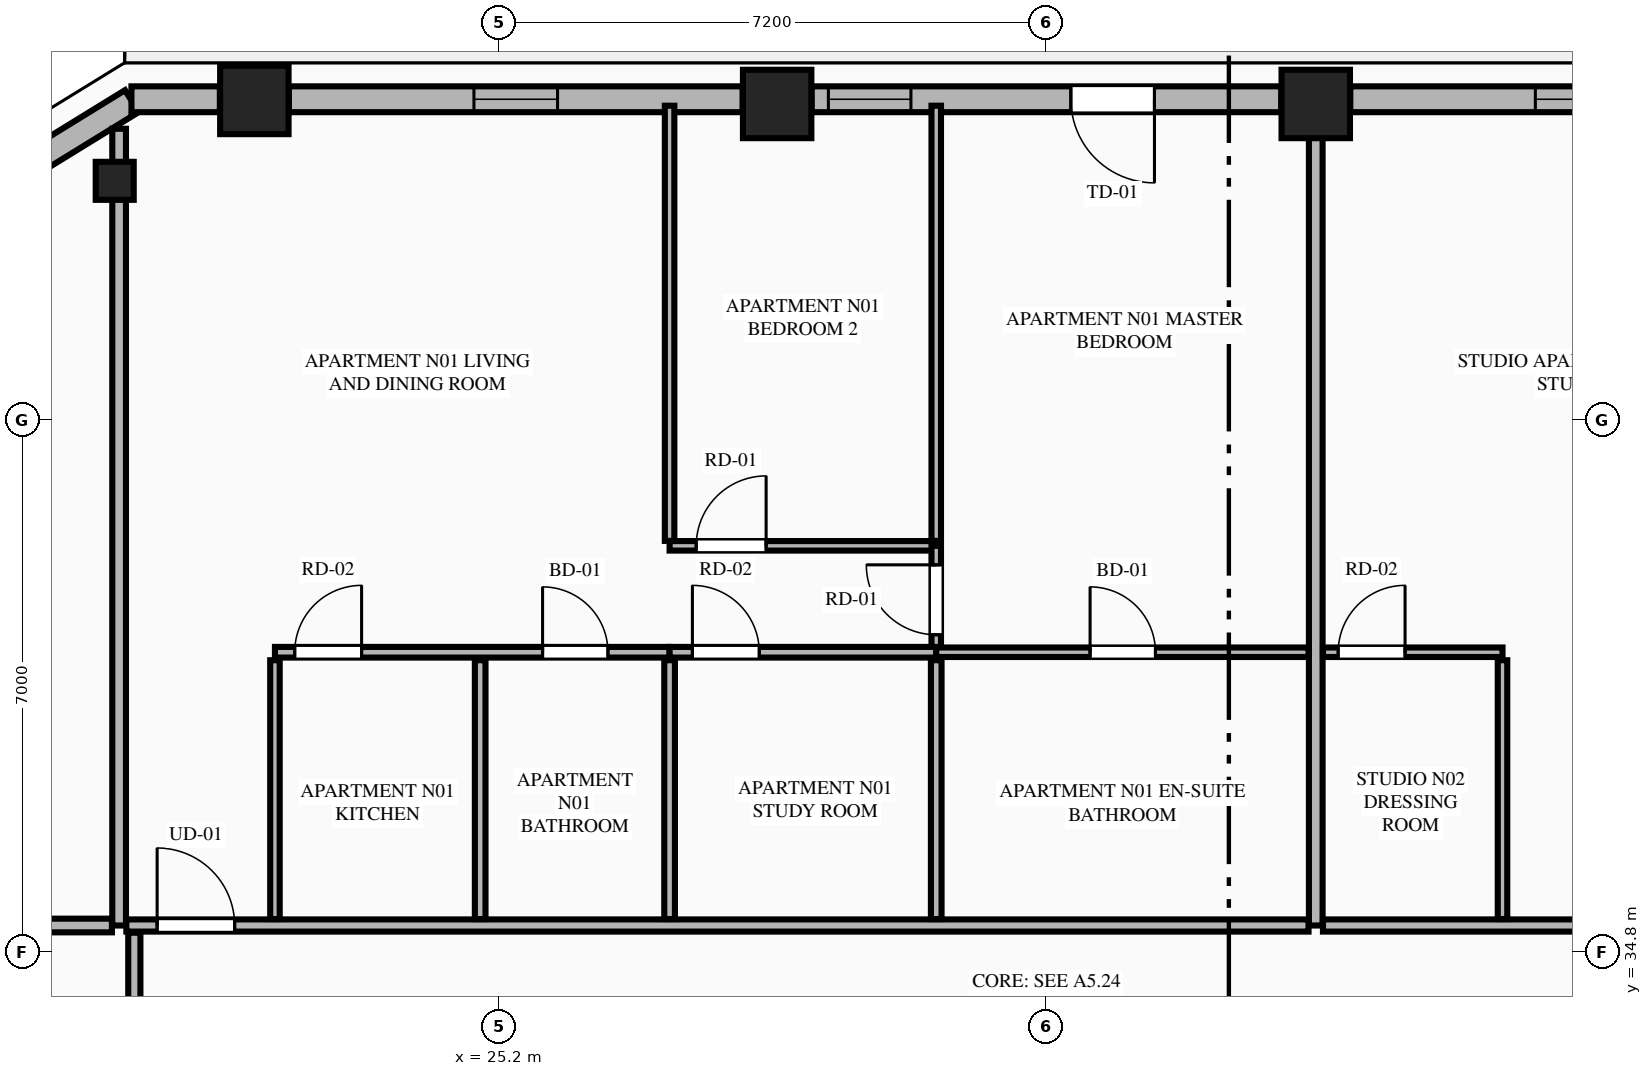
"""IFC4 building model, lengths in metres.
Left out: names, types, materials, properties, quantities, classifications, styles, units other than length and angle.
Written with IfcOpenShell. Run it as: python <this file> out.ifc"""

import sys

from ifc_helpers import new_model, si_unit, direction, frame, frame_2d, origin, origin_2d, place, context, subcontext, project, spatial, rectangle, extrude, element, fill, save


model = new_model("IFC4")
c1 = context("Model", 3, precision=1e-05, world=origin(), true_north=direction((0.0, 1.0)))
c2 = subcontext(c1, "Body", "Model", "MODEL_VIEW")
j1 = project(units=[si_unit("LENGTHUNIT", "METRE"), si_unit("PLANEANGLEUNIT", "RADIAN")], contexts=[c1])
p1 = place(None, origin())
s1 = spatial("IfcSite", under=j1, at=p1, CompositionType="ELEMENT")
p2 = place(p1, origin())
s2 = spatial("IfcBuilding", under=s1, at=p2, CompositionType="ELEMENT")
p3 = place(p2, frame((0.0, 0.0, 175.45)))
s3 = spatial("IfcBuildingStorey", under=s2, at=p3, CompositionType="ELEMENT", Elevation=175.45)
for number, where, z_axis, x_axis in (
    (1, (35.943, 45.958, 0.0), (0.0, 0.0, 1.0), (1.0, 0.0, 0.0)),
    (2, (28.857, 45.958, 0.0), (0.0, 0.0, 1.0), (1.0, 0.0, 0.0)),
    (3, (21.979, 46.011, 0.0), (0.0, 0.0, 1.0), (1.0, 0.0, 0.0)),
):
    element("IfcColumn", number, at=place(p3, frame(where, z_axis=z_axis, x_axis=x_axis)), inside=s3, PredefinedType="COLUMN", context=c2, shape_type="SweptSolid", body=[
        extrude(rectangle(XDim=0.9, YDim=0.9, at=origin_2d()), origin(), (0.0, 0.0, 1.0), 3.55),
    ])
p4 = place(p3, frame((20.142, 44.947, 0.0), z_axis=(0.0, 0.0, 1.0), x_axis=(-0.865230187018, -0.501374833306, 0.0)))
e4 = element("IfcColumn", 4, at=p4, inside=s3, PredefinedType="PILASTER", context=c2, shape_type="SweptSolid", body=[
    extrude(rectangle(XDim=0.5, YDim=0.35, at=origin_2d()), origin(), (0.0, 0.0, 1.0), 3.55),
])
p5 = place(p3, frame((20.367, 45.995, 0.0), z_axis=(0.0, 0.0, 1.0), x_axis=(-0.851713271379, -0.524008113828, 0.0)))
e5 = element("IfcWall", 5, at=p5, inside=s3, PredefinedType="STANDARD", context=c2, shape_type="SweptSolid", body=[
    extrude(rectangle(XDim=1.678, YDim=0.34, at=frame_2d((0.839, 0.0))), origin(), (0.0, 0.0, 1.0), 3.35),
])
p6 = place(p3, frame((42.367, 46.02, 0.0), z_axis=(0.0, 0.0, 1.0), x_axis=(-1.0, 0.0, 0.0)))
e6 = element("IfcWall", 6, at=p6, inside=s3, PredefinedType="STANDARD", context=c2, shape_type="SweptSolid", body=[
    extrude(rectangle(XDim=5.97, YDim=0.34, at=frame_2d((2.985, 0.0))), origin(), (0.0, 0.0, 1.0), 2.883),
])
p7 = place(p6, frame((2.435, 0.0, 0.75)))
e7 = element("IfcOpeningElement", 7, at=p7, cuts=e6, PredefinedType="OPENING", context=c2, shape_type="SweptSolid", body=[
    extrude(rectangle(XDim=1.1, YDim=1.983, at=frame_2d((0.55, 0.991))), frame((0.0, 0.18, 0.0), z_axis=(0.0, -1.0, 0.0), x_axis=(1.0, 0.0, 0.0)), (0.0, 0.0, 1.0), 0.36),
])
p8 = place(p3, frame((35.489, 46.02, 0.0), z_axis=(0.0, 0.0, 1.0), x_axis=(-1.0, 0.0, 0.0)))
e8 = element("IfcWall", 8, at=p8, inside=s3, PredefinedType="STANDARD", context=c2, shape_type="SweptSolid", body=[
    extrude(rectangle(XDim=6.178, YDim=0.34, at=frame_2d((3.089, 0.0))), origin(), (0.0, 0.0, 1.0), 2.883),
])
p9 = place(p8, frame((1.668, 0.0, 0.0)))
e9 = element("IfcOpeningElement", 9, at=p9, cuts=e8, PredefinedType="OPENING", context=c2, shape_type="SweptSolid", body=[
    extrude(rectangle(XDim=1.1, YDim=2.25, at=frame_2d((0.55, 1.125))), frame((0.0, 0.18, 0.0), z_axis=(0.0, -1.0, 0.0), x_axis=(1.0, 0.0, 0.0)), (0.0, 0.0, 1.0), 0.36),
])
p10 = place(p8, frame((4.872, 0.0, 0.75)))
e10 = element("IfcOpeningElement", 10, at=p10, cuts=e8, PredefinedType="OPENING", context=c2, shape_type="SweptSolid", body=[
    extrude(rectangle(XDim=1.086, YDim=1.983, at=frame_2d((0.543, 0.991))), frame((0.0, 0.18, 0.0), z_axis=(0.0, -1.0, 0.0), x_axis=(1.0, 0.0, 0.0)), (0.0, 0.0, 1.0), 0.36),
])
p11 = place(p3, frame((28.403, 46.02, 0.0), z_axis=(0.0, 0.0, 1.0), x_axis=(-1.0, 0.0, 0.0)))
e11 = element("IfcWall", 11, at=p11, inside=s3, PredefinedType="STANDARD", context=c2, shape_type="SweptSolid", body=[
    extrude(rectangle(XDim=5.97, YDim=0.34, at=frame_2d((2.985, 0.0))), origin(), (0.0, 0.0, 1.0), 2.883),
])
p12 = place(p11, frame((2.435, 0.0, 0.75)))
e12 = element("IfcOpeningElement", 12, at=p12, cuts=e11, PredefinedType="OPENING", context=c2, shape_type="SweptSolid", body=[
    extrude(rectangle(XDim=1.1, YDim=1.983, at=frame_2d((0.55, 0.991))), frame((0.0, 0.18, 0.0), z_axis=(0.0, -1.0, 0.0), x_axis=(1.0, 0.0, 0.0)), (0.0, 0.0, 1.0), 0.36),
])
p13 = place(p3, frame((21.525, 46.02, 0.0), z_axis=(0.0, 0.0, 1.0), x_axis=(-1.0, 0.0, 0.0)))
e13 = element("IfcWall", 13, at=p13, inside=s3, PredefinedType="STANDARD", context=c2, shape_type="SweptSolid", body=[
    extrude(rectangle(XDim=1.163, YDim=0.34, at=frame_2d((0.582, 0.0))), origin(), (0.0, 0.0, 1.0), 3.35),
])
p14 = place(p3, frame((20.2, 35.15, 0.0), z_axis=(0.0, 0.0, 1.0), x_axis=(0.0, 1.0, 0.0)))
e14 = element("IfcWall", 14, at=p14, inside=s3, PredefinedType="PARTITIONING", context=c2, shape_type="SweptSolid", body=[
    extrude(rectangle(XDim=10.482, YDim=0.18, at=frame_2d((5.241, 0.0))), origin(), (0.0, 0.0, 1.0), 3.35),
])
p15 = place(p3, frame((35.943, 35.15, 0.0), z_axis=(0.0, 0.0, 1.0), x_axis=(0.0, 1.0, 0.0)))
e15 = element("IfcWall", 15, at=p15, inside=s3, PredefinedType="PARTITIONING", context=c2, shape_type="SweptSolid", body=[
    extrude(rectangle(XDim=10.695, YDim=0.18, at=frame_2d((5.348, 0.0))), origin(), (0.0, 0.0, 1.0), 2.807),
])
p16 = place(p3, frame((20.295, 35.15, 0.0), z_axis=(0.0, 0.0, 1.0), x_axis=(1.0, 0.0, 0.0)))
e16 = element("IfcWall", 16, at=p16, inside=s3, PredefinedType="PARTITIONING", context=c2, shape_type="SweptSolid", body=[
    extrude(rectangle(XDim=15.553, YDim=0.16, at=frame_2d((7.776, 0.0))), origin(), (0.0, 0.0, 1.0), 3.35),
])
p17 = place(p16, frame((0.405, 0.0, 0.0)))
e17 = element("IfcOpeningElement", 17, at=p17, cuts=e16, PredefinedType="OPENING", context=c2, shape_type="SweptSolid", body=[
    extrude(rectangle(XDim=1.02, YDim=2.25, at=frame_2d((0.51, 1.125))), frame((0.0, 0.09, 0.0), z_axis=(0.0, -1.0, 0.0), x_axis=(1.0, 0.0, 0.0)), (0.0, 0.0, 1.0), 0.18),
])
p18 = place(p3, frame((22.25, 35.235, 0.0), z_axis=(0.0, 0.0, 1.0), x_axis=(0.0, 1.0, 0.0)))
e18 = element("IfcWall", 18, at=p18, inside=s3, PredefinedType="PARTITIONING", context=c2, shape_type="SweptSolid", body=[
    extrude(rectangle(XDim=3.405, YDim=0.125, at=frame_2d((1.702, 0.0))), origin(), (0.0, 0.0, 1.0), 2.807),
])
p19 = place(p3, frame((22.25, 38.745, 0.0), z_axis=(0.0, 0.0, 1.0), x_axis=(1.0, 0.0, 0.0)))
e19 = element("IfcWall", 19, at=p19, inside=s3, PredefinedType="PLUMBINGWALL", context=c2, shape_type="SweptSolid", body=[
    extrude(rectangle(XDim=5.192, YDim=0.14, at=frame_2d((2.596, 0.0))), origin(), (0.0, 0.0, 1.0), 3.35),
])
p20 = place(p19, frame((3.521, 0.0, 0.0)))
e20 = element("IfcOpeningElement", 20, at=p20, cuts=e19, PredefinedType="OPENING", context=c2, shape_type="SweptSolid", body=[
    extrude(rectangle(XDim=0.86, YDim=2.1, at=frame_2d((0.43, 1.05))), frame((0.0, 0.08, 0.0), z_axis=(0.0, -1.0, 0.0), x_axis=(1.0, 0.0, 0.0)), (0.0, 0.0, 1.0), 0.16),
])
p21 = place(p19, frame((0.26, 0.0, 0.0)))
e21 = element("IfcOpeningElement", 21, at=p21, cuts=e19, PredefinedType="OPENING", context=c2, shape_type="SweptSolid", body=[
    extrude(rectangle(XDim=0.88, YDim=2.15, at=frame_2d((0.44, 1.075))), frame((0.0, 0.08, 0.0), z_axis=(0.0, -1.0, 0.0), x_axis=(1.0, 0.0, 0.0)), (0.0, 0.0, 1.0), 0.16),
])
p22 = place(p3, frame((27.442, 38.745, 0.0), z_axis=(0.0, 0.0, 1.0), x_axis=(1.0, 0.0, 0.0)))
e22 = element("IfcWall", 22, at=p22, inside=s3, PredefinedType="PLUMBINGWALL", context=c2, shape_type="SweptSolid", body=[
    extrude(rectangle(XDim=3.508, YDim=0.14, at=frame_2d((1.754, 0.0))), origin(), (0.0, 0.0, 1.0), 3.35),
])
p23 = place(p22, frame((0.3, 0.0, 0.0)))
e23 = element("IfcOpeningElement", 23, at=p23, cuts=e22, PredefinedType="OPENING", context=c2, shape_type="SweptSolid", body=[
    extrude(rectangle(XDim=0.88, YDim=2.15, at=frame_2d((0.44, 1.075))), frame((0.0, 0.08, 0.0), z_axis=(0.0, -1.0, 0.0), x_axis=(1.0, 0.0, 0.0)), (0.0, 0.0, 1.0), 0.16),
])
p24 = place(p3, frame((30.95, 38.745, 0.0), z_axis=(0.0, 0.0, 1.0), x_axis=(1.0, 0.0, 0.0)))
e24 = element("IfcWall", 24, at=p24, inside=s3, PredefinedType="PARTITIONING", context=c2, shape_type="SweptSolid", body=[
    extrude(rectangle(XDim=4.898, YDim=0.125, at=frame_2d((2.449, 0.0))), origin(), (0.0, 0.0, 1.0), 3.35),
])
p25 = place(p24, frame((2.024, 0.0, 0.0)))
e25 = element("IfcOpeningElement", 25, at=p25, cuts=e24, PredefinedType="OPENING", context=c2, shape_type="SweptSolid", body=[
    extrude(rectangle(XDim=0.86, YDim=2.1, at=frame_2d((0.43, 1.05))), frame((0.0, 0.073, 0.0), z_axis=(0.0, -1.0, 0.0), x_axis=(1.0, 0.0, 0.0)), (0.0, 0.0, 1.0), 0.145),
])
p26 = place(p3, frame((24.95, 35.235, 0.0), z_axis=(0.0, 0.0, 1.0), x_axis=(0.0, 1.0, 0.0)))
e26 = element("IfcWall", 26, at=p26, inside=s3, PredefinedType="PLUMBINGWALL", context=c2, shape_type="SweptSolid", body=[
    extrude(rectangle(XDim=3.405, YDim=0.14, at=frame_2d((1.702, 0.0))), origin(), (0.0, 0.0, 1.0), 3.35),
])
p27 = place(p3, frame((27.442, 40.21, 0.0), z_axis=(0.0, 0.0, 1.0), x_axis=(0.0, 1.0, 0.0)))
e27 = element("IfcWall", 27, at=p27, inside=s3, PredefinedType="PARTITIONING", context=c2, shape_type="SweptSolid", body=[
    extrude(rectangle(XDim=5.725, YDim=0.125, at=frame_2d((2.863, 0.0))), origin(), (0.0, 0.0, 1.0), 3.35),
])
p28 = place(p3, frame((27.442, 40.145, 0.0), z_axis=(0.0, 0.0, 1.0), x_axis=(1.0, 0.0, 0.0)))
e28 = element("IfcWall", 28, at=p28, inside=s3, PredefinedType="PARTITIONING", context=c2, shape_type="SweptSolid", body=[
    extrude(rectangle(XDim=3.508, YDim=0.125, at=frame_2d((1.754, 0.0))), origin(), (0.0, 0.0, 1.0), 3.35),
])
p29 = place(p28, frame((0.35, 0.0, 0.0)))
e29 = element("IfcOpeningElement", 29, at=p29, cuts=e28, PredefinedType="OPENING", context=c2, shape_type="SweptSolid", body=[
    extrude(rectangle(XDim=0.92, YDim=2.15, at=frame_2d((0.46, 1.075))), frame((0.0, 0.073, 0.0), z_axis=(0.0, -1.0, 0.0), x_axis=(1.0, 0.0, 0.0)), (0.0, 0.0, 1.0), 0.145),
])
p30 = place(p3, frame((30.95, 38.815, 0.0), z_axis=(0.0, 0.0, 1.0), x_axis=(0.0, 1.0, 0.0)))
e30 = element("IfcWall", 30, at=p30, inside=s3, PredefinedType="PARTITIONING", context=c2, shape_type="SweptSolid", body=[
    extrude(rectangle(XDim=1.33, YDim=0.125, at=frame_2d((0.665, 0.0))), origin(), (0.0, 0.0, 1.0), 3.35),
])
p31 = place(p30, frame((0.16, 0.0, 0.0)))
e31 = element("IfcOpeningElement", 31, at=p31, cuts=e30, PredefinedType="OPENING", context=c2, shape_type="SweptSolid", body=[
    extrude(rectangle(XDim=0.92, YDim=2.15, at=frame_2d((0.46, 1.075))), frame((0.0, 0.073, 0.0), z_axis=(0.0, -1.0, 0.0), x_axis=(1.0, 0.0, 0.0)), (0.0, 0.0, 1.0), 0.145),
])
for number, where, z_axis, x_axis in (
    (32, (27.442, 35.235, 0.0), (0.0, 0.0, 1.0), (0.0, 1.0, 0.0)),
    (33, (30.95, 35.235, 0.0), (0.0, 0.0, 1.0), (0.0, 1.0, 0.0)),
):
    element("IfcWall", number, at=place(p3, frame(where, z_axis=z_axis, x_axis=x_axis)), inside=s3, PredefinedType="PLUMBINGWALL", context=c2, shape_type="SweptSolid", body=[
        extrude(rectangle(XDim=3.405, YDim=0.14, at=frame_2d((1.702, 0.0))), origin(), (0.0, 0.0, 1.0), 3.35),
    ])
p32 = place(p3, frame((30.95, 40.21, 0.0), z_axis=(0.0, 0.0, 1.0), x_axis=(0.0, 1.0, 0.0)))
e34 = element("IfcWall", 34, at=p32, inside=s3, PredefinedType="PARTITIONING", context=c2, shape_type="SweptSolid", body=[
    extrude(rectangle(XDim=5.725, YDim=0.125, at=frame_2d((2.863, 0.0))), origin(), (0.0, 0.0, 1.0), 3.35),
])
p33 = place(p3, frame((36.038, 35.15, 0.0), z_axis=(0.0, 0.0, 1.0), x_axis=(1.0, 0.0, 0.0)))
e35 = element("IfcWall", 35, at=p33, inside=s3, PredefinedType="PARTITIONING", context=c2, shape_type="SweptSolid", body=[
    extrude(rectangle(XDim=8.467, YDim=0.16, at=frame_2d((4.233, 0.0))), origin(), (0.0, 0.0, 1.0), 3.35),
])
p34 = place(p33, frame((6.212, 0.0, 0.0)))
e36 = element("IfcOpeningElement", 36, at=p34, cuts=e35, PredefinedType="OPENING", context=c2, shape_type="SweptSolid", body=[
    extrude(rectangle(XDim=1.02, YDim=2.25, at=frame_2d((0.51, 1.125))), frame((0.0, 0.09, 0.0), z_axis=(0.0, -1.0, 0.0), x_axis=(1.0, 0.0, 0.0)), (0.0, 0.0, 1.0), 0.18),
])
p35 = place(p3, frame((38.4, 35.235, 0.0), z_axis=(0.0, 0.0, 1.0), x_axis=(0.0, 1.0, 0.0)))
e37 = element("IfcWall", 37, at=p35, inside=s3, PredefinedType="PARTITIONING", context=c2, shape_type="SweptSolid", body=[
    extrude(rectangle(XDim=3.405, YDim=0.125, at=frame_2d((1.702, 0.0))), origin(), (0.0, 0.0, 1.0), 3.35),
])
p36 = place(p3, frame((36.038, 38.745, 0.0), z_axis=(0.0, 0.0, 1.0), x_axis=(1.0, 0.0, 0.0)))
e38 = element("IfcWall", 38, at=p36, inside=s3, PredefinedType="PARTITIONING", context=c2, shape_type="SweptSolid", body=[
    extrude(rectangle(XDim=2.362, YDim=0.125, at=frame_2d((1.181, 0.0))), origin(), (0.0, 0.0, 1.0), 3.35),
])
p37 = place(p36, frame((0.2, 0.0, 0.0)))
e39 = element("IfcOpeningElement", 39, at=p37, cuts=e38, PredefinedType="OPENING", context=c2, shape_type="SweptSolid", body=[
    extrude(rectangle(XDim=0.88, YDim=2.15, at=frame_2d((0.44, 1.075))), frame((0.0, 0.073, 0.0), z_axis=(0.0, -1.0, 0.0), x_axis=(1.0, 0.0, 0.0)), (0.0, 0.0, 1.0), 0.145),
])
p38 = place(p3, frame((14.11, 35.15, 0.0), z_axis=(0.0, 0.0, 1.0), x_axis=(1.0, 0.0, 0.0)))
e40 = element("IfcWall", 40, at=p38, inside=s3, PredefinedType="PARTITIONING", context=c2, shape_type="SweptSolid", body=[
    extrude(rectangle(XDim=5.995, YDim=0.18, at=frame_2d((2.998, 0.0))), origin(), (0.0, 0.0, 1.0), 3.35),
])
p39 = place(p3, frame((20.4, 16.345, 0.0), z_axis=(0.0, 0.0, 1.0), x_axis=(0.0, 1.0, 0.0)))
e41 = element("IfcWall", 41, at=p39, inside=s3, PredefinedType="PARTITIONING", context=c2, shape_type="SweptSolid", body=[
    extrude(rectangle(XDim=18.71, YDim=0.16, at=frame_2d((9.355, 0.0))), origin(), (0.0, 0.0, 1.0), 3.35),
])
p40 = place(p39, frame((0.45, 0.0, 0.0)))
e42 = element("IfcOpeningElement", 42, at=p40, cuts=e41, PredefinedType="OPENING", context=c2, shape_type="SweptSolid", body=[
    extrude(rectangle(XDim=1.02, YDim=2.25, at=frame_2d((0.51, 1.125))), frame((0.0, 0.09, 0.0), z_axis=(0.0, -1.0, 0.0), x_axis=(1.0, 0.0, 0.0)), (0.0, 0.0, 1.0), 0.18),
])
p41 = place(p7, origin())
e43 = element("IfcWindow", 43, at=p41, inside=s3, PartitioningType="SINGLE_PANEL", PredefinedType="WINDOW", context=c2, shape_type="SweptSolid", body=[
    extrude(rectangle(XDim=1.1, YDim=1.983, at=frame_2d((0.55, 0.991))), frame((0.0, 0.03, 0.0), z_axis=(0.0, -1.0, 0.0), x_axis=(1.0, 0.0, 0.0)), (0.0, 0.0, 1.0), 0.06),
])
fill(e7, e43)
p42 = place(p9, origin())
e44 = element("IfcDoor", 44, at=p42, inside=s3, OperationType="SINGLE_SWING_LEFT", PredefinedType="DOOR", context=c2, shape_type="SweptSolid", body=[
    extrude(rectangle(XDim=1.1, YDim=2.25, at=frame_2d((0.55, 1.125))), frame((0.0, 0.025, 0.0), z_axis=(0.0, -1.0, 0.0), x_axis=(1.0, 0.0, 0.0)), (0.0, 0.0, 1.0), 0.05),
])
fill(e9, e44)
p43 = place(p12, origin())
e45 = element("IfcWindow", 45, at=p43, inside=s3, PartitioningType="SINGLE_PANEL", PredefinedType="WINDOW", context=c2, shape_type="SweptSolid", body=[
    extrude(rectangle(XDim=1.1, YDim=1.983, at=frame_2d((0.55, 0.991))), frame((0.0, 0.03, 0.0), z_axis=(0.0, -1.0, 0.0), x_axis=(1.0, 0.0, 0.0)), (0.0, 0.0, 1.0), 0.06),
])
fill(e12, e45)
p44 = place(p20, origin())
e46 = element("IfcDoor", 46, at=p44, inside=s3, OperationType="SINGLE_SWING_LEFT", PredefinedType="DOOR", context=c2, shape_type="SweptSolid", body=[
    extrude(rectangle(XDim=0.86, YDim=2.1, at=frame_2d((0.43, 1.05))), frame((0.0, 0.025, 0.0), z_axis=(0.0, -1.0, 0.0), x_axis=(1.0, 0.0, 0.0)), (0.0, 0.0, 1.0), 0.05),
])
fill(e20, e46)
p45 = place(p25, origin())
e47 = element("IfcDoor", 47, at=p45, inside=s3, OperationType="SINGLE_SWING_LEFT", PredefinedType="DOOR", context=c2, shape_type="SweptSolid", body=[
    extrude(rectangle(XDim=0.86, YDim=2.1, at=frame_2d((0.43, 1.05))), frame((0.0, 0.025, 0.0), z_axis=(0.0, -1.0, 0.0), x_axis=(1.0, 0.0, 0.0)), (0.0, 0.0, 1.0), 0.05),
])
fill(e25, e47)
p46 = place(p17, origin())
e48 = element("IfcDoor", 48, at=p46, inside=s3, OperationType="SINGLE_SWING_LEFT", PredefinedType="DOOR", context=c2, shape_type="SweptSolid", body=[
    extrude(rectangle(XDim=1.02, YDim=2.25, at=frame_2d((0.51, 1.125))), frame((0.0, 0.025, 0.0), z_axis=(0.0, -1.0, 0.0), x_axis=(1.0, 0.0, 0.0)), (0.0, 0.0, 1.0), 0.05),
])
fill(e17, e48)
p47 = place(p21, origin())
e49 = element("IfcDoor", 49, at=p47, inside=s3, OperationType="SINGLE_SWING_RIGHT", PredefinedType="DOOR", context=c2, shape_type="SweptSolid", body=[
    extrude(rectangle(XDim=0.88, YDim=2.15, at=frame_2d((0.44, 1.075))), frame((0.0, 0.025, 0.0), z_axis=(0.0, -1.0, 0.0), x_axis=(1.0, 0.0, 0.0)), (0.0, 0.0, 1.0), 0.05),
])
fill(e21, e49)
p48 = place(p23, origin())
e50 = element("IfcDoor", 50, at=p48, inside=s3, OperationType="SINGLE_SWING_LEFT", PredefinedType="DOOR", context=c2, shape_type="SweptSolid", body=[
    extrude(rectangle(XDim=0.88, YDim=2.15, at=frame_2d((0.44, 1.075))), frame((0.0, 0.025, 0.0), z_axis=(0.0, -1.0, 0.0), x_axis=(1.0, 0.0, 0.0)), (0.0, 0.0, 1.0), 0.05),
])
fill(e23, e50)
p49 = place(p29, origin())
e51 = element("IfcDoor", 51, at=p49, inside=s3, OperationType="SINGLE_SWING_RIGHT", PredefinedType="DOOR", context=c2, shape_type="SweptSolid", body=[
    extrude(rectangle(XDim=0.92, YDim=2.15, at=frame_2d((0.46, 1.075))), frame((0.0, 0.025, 0.0), z_axis=(0.0, -1.0, 0.0), x_axis=(1.0, 0.0, 0.0)), (0.0, 0.0, 1.0), 0.05),
])
fill(e29, e51)
p50 = place(p31, origin())
e52 = element("IfcDoor", 52, at=p50, inside=s3, OperationType="SINGLE_SWING_RIGHT", PredefinedType="DOOR", context=c2, shape_type="SweptSolid", body=[
    extrude(rectangle(XDim=0.92, YDim=2.15, at=frame_2d((0.46, 1.075))), frame((0.0, 0.025, 0.0), z_axis=(0.0, -1.0, 0.0), x_axis=(1.0, 0.0, 0.0)), (0.0, 0.0, 1.0), 0.05),
])
fill(e31, e52)
p51 = place(p37, origin())
e53 = element("IfcDoor", 53, at=p51, inside=s3, OperationType="SINGLE_SWING_RIGHT", PredefinedType="DOOR", context=c2, shape_type="SweptSolid", body=[
    extrude(rectangle(XDim=0.88, YDim=2.15, at=frame_2d((0.44, 1.075))), frame((0.0, 0.025, 0.0), z_axis=(0.0, -1.0, 0.0), x_axis=(1.0, 0.0, 0.0)), (0.0, 0.0, 1.0), 0.05),
])
fill(e39, e53)
p52 = place(p10, origin())
e54 = element("IfcWindow", 54, at=p52, inside=s3, PartitioningType="SINGLE_PANEL", PredefinedType="WINDOW", context=c2, shape_type="SweptSolid", body=[
    extrude(rectangle(XDim=1.086, YDim=1.983, at=frame_2d((0.543, 0.991))), frame((0.0, 0.03, 0.0), z_axis=(0.0, -1.0, 0.0), x_axis=(1.0, 0.0, 0.0)), (0.0, 0.0, 1.0), 0.06),
])
fill(e10, e54)
save(model, sys.argv[1])
